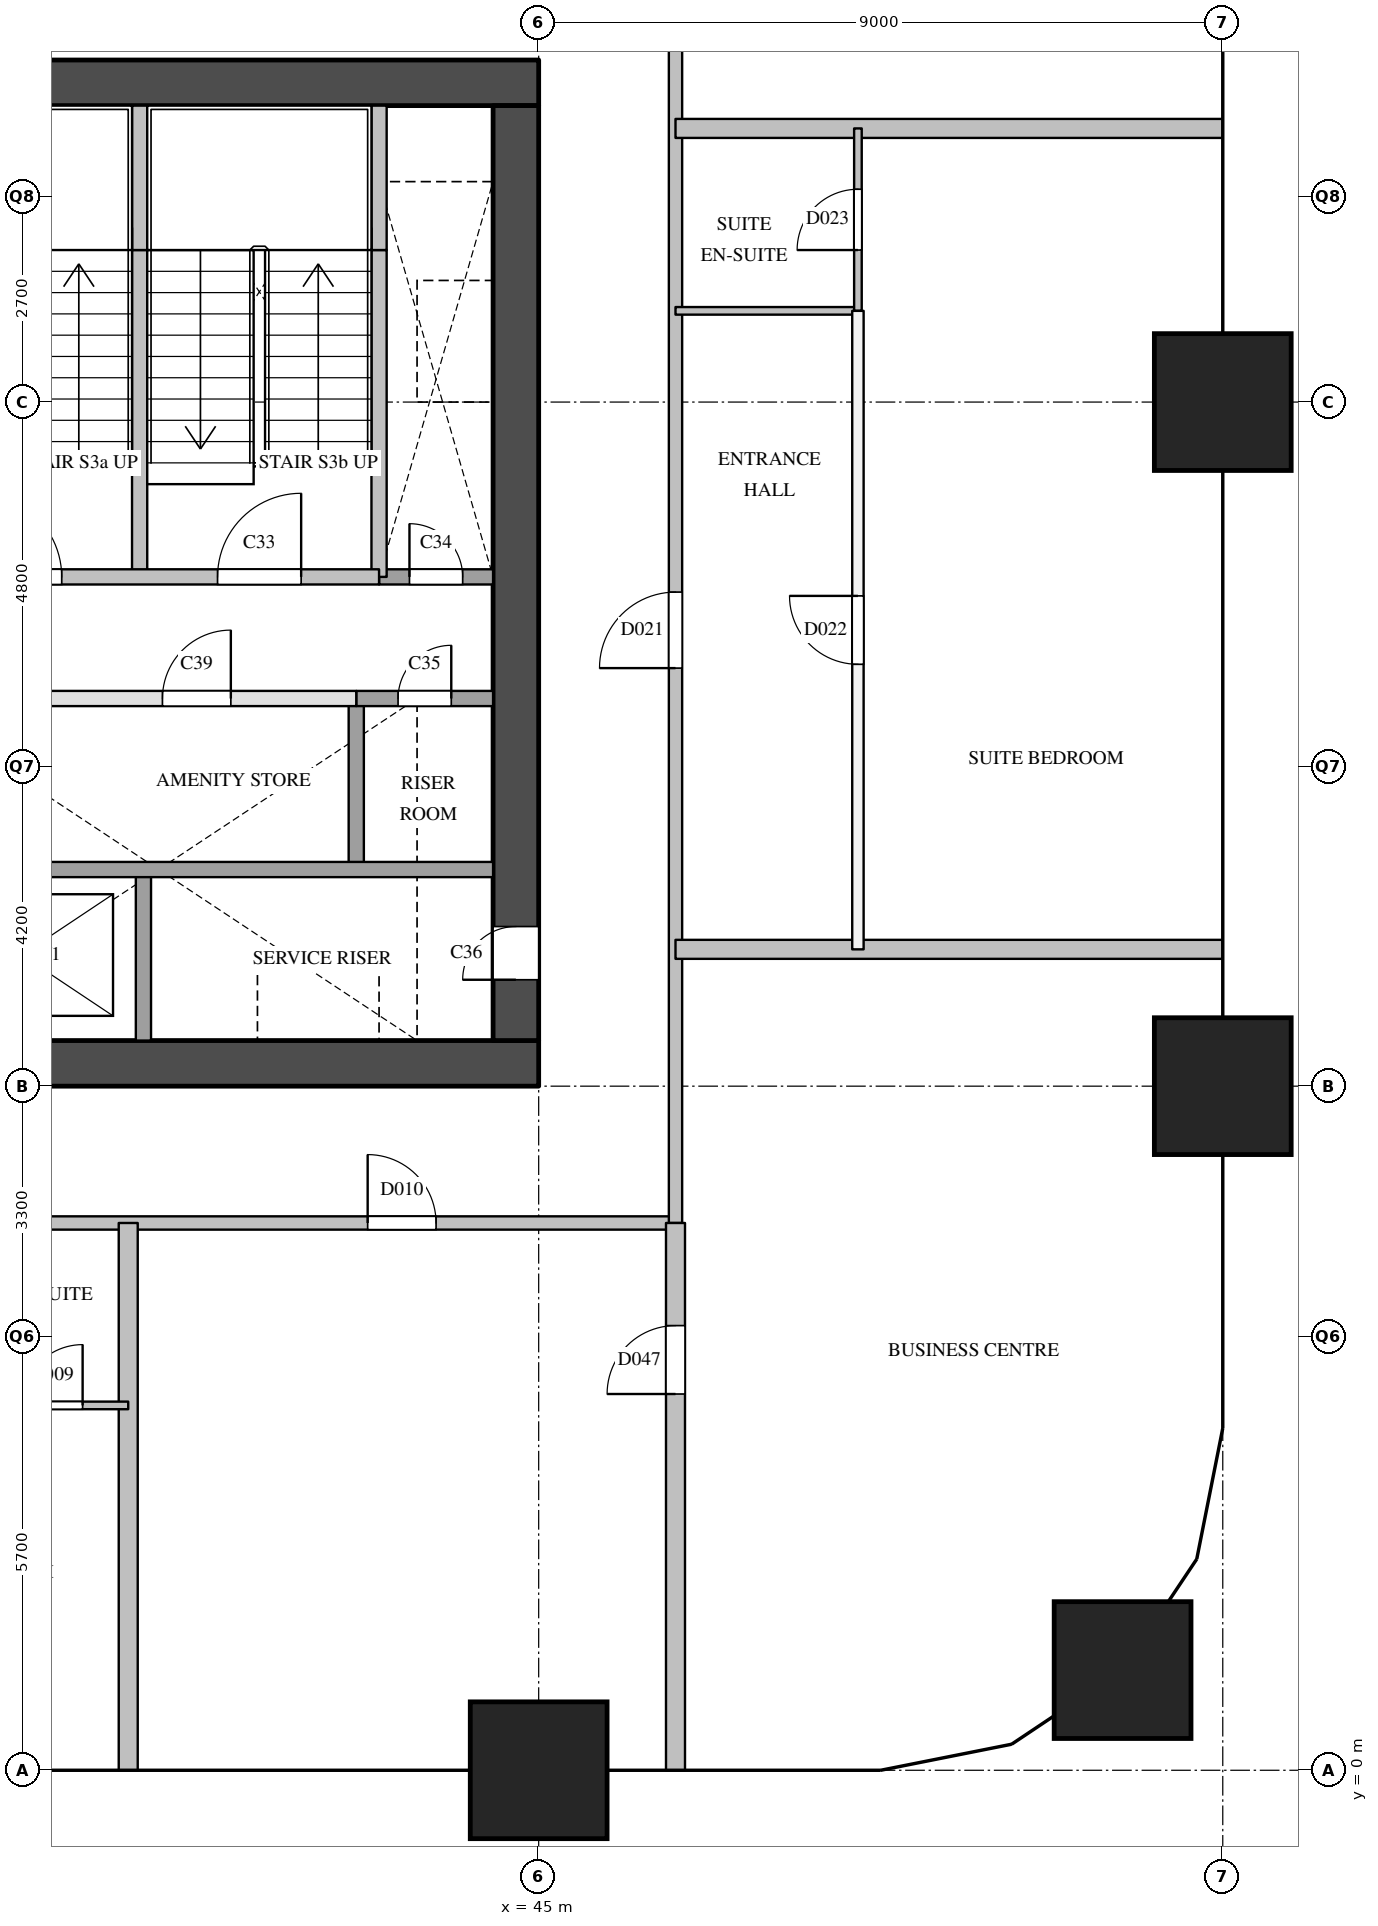
"""IFC4 building model, lengths in metres.
Left out: names, types, materials, properties, quantities, classifications, styles, units other than length and angle.
Written with IfcOpenShell. Run it as: python <this file> out.ifc"""

import sys

from ifc_helpers import new_model, si_unit, direction, frame, frame_2d, origin, origin_2d, place, context, subcontext, project, spatial, rectangle, extrude, element, fill, save


model = new_model("IFC4")
c1 = context("Model", 3, precision=1e-05, world=origin(), true_north=direction((0.0, 1.0)))
c2 = subcontext(c1, "Body", "Model", "MODEL_VIEW")
j1 = project(units=[si_unit("LENGTHUNIT", "METRE"), si_unit("PLANEANGLEUNIT", "RADIAN")], contexts=[c1])
p1 = place(None, origin())
s1 = spatial("IfcSite", under=j1, at=p1, CompositionType="ELEMENT")
p2 = place(p1, origin())
s2 = spatial("IfcBuilding", under=s1, at=p2, CompositionType="ELEMENT")
p3 = place(p2, frame((0.0, 0.0, 57.6)))
s3 = spatial("IfcBuildingStorey", under=s2, at=p3, CompositionType="ELEMENT", Elevation=57.6)
for number, where, z_axis, x_axis in (
    (1, (45.0, 0.0, 0.0), (0.0, 0.0, 1.0), (1.0, 0.0, 0.0)),
    (2, (52.682, 1.318, 0.0), (0.0, 0.0, 1.0), (1.0, 0.0, 0.0)),
    (3, (54.0, 9.0, 0.0), (0.0, 0.0, 1.0), (1.0, 0.0, 0.0)),
    (4, (54.0, 18.0, 0.0), (0.0, 0.0, 1.0), (1.0, 0.0, 0.0)),
):
    element("IfcColumn", number, at=place(p3, frame(where, z_axis=z_axis, x_axis=x_axis)), inside=s3, PredefinedType="COLUMN", context=c2, shape_type="SweptSolid", body=[
        extrude(rectangle(XDim=1.8, YDim=1.8, at=origin_2d()), origin(), (0.0, 0.0, 1.0), 3.8),
    ])
for number, where, z_axis, x_axis in (
    (5, (36.0, 9.3, 0.0), (0.0, 0.0, 1.0), (1.0, 0.0, 0.0)),
    (6, (36.0, 22.2, 0.0), (0.0, 0.0, 1.0), (1.0, 0.0, 0.0)),
):
    element("IfcWall", number, at=place(p3, frame(where, z_axis=z_axis, x_axis=x_axis)), inside=s3, PredefinedType="SHEAR", context=c2, shape_type="SweptSolid", body=[
        extrude(rectangle(XDim=9.0, YDim=0.6, at=frame_2d((4.5, 0.0))), origin(), (0.0, 0.0, 1.0), 3.5),
    ])
p4 = place(p3, frame((44.7, 9.6, 0.0), z_axis=(0.0, 0.0, 1.0), x_axis=(0.0, 1.0, 0.0)))
e7 = element("IfcWall", 7, at=p4, inside=s3, PredefinedType="SHEAR", context=c2, shape_type="SweptSolid", body=[
    extrude(rectangle(XDim=12.3, YDim=0.6, at=frame_2d((6.15, 0.0))), origin(), (0.0, 0.0, 1.0), 3.5),
])
p5 = place(p4, frame((0.8, 0.0, 0.0)))
e8 = element("IfcOpeningElement", 8, at=p5, cuts=e7, PredefinedType="OPENING", context=c2, shape_type="SweptSolid", body=[
    extrude(rectangle(XDim=0.7, YDim=2.1, at=frame_2d((0.35, 1.05))), frame((0.0, 0.31, 0.0), z_axis=(0.0, -1.0, 0.0), x_axis=(1.0, 0.0, 0.0)), (0.0, 0.0, 1.0), 0.62),
])
p6 = place(p3, frame((39.75, 15.7, 0.0), z_axis=(0.0, 0.0, 1.0), x_axis=(0.0, 1.0, 0.0)))
e9 = element("IfcWall", 9, at=p6, inside=s3, PredefinedType="SOLIDWALL", context=c2, shape_type="SweptSolid", body=[
    extrude(rectangle(XDim=4.3, YDim=0.2, at=frame_2d((2.15, 0.0))), origin(), (0.0, 0.0, 1.0), 3.5),
])
p7 = place(p3, frame((39.75, 20.0, 0.0), z_axis=(0.0, 0.0, 1.0), x_axis=(0.0, 1.0, 0.0)))
e10 = element("IfcWall", 10, at=p7, inside=s3, PredefinedType="SOLIDWALL", context=c2, shape_type="SweptSolid", body=[
    extrude(rectangle(XDim=1.9, YDim=0.2, at=frame_2d((0.95, 0.0))), origin(), (0.0, 0.0, 1.0), 3.5),
])
p8 = place(p3, frame((39.8, 9.6, 0.0), z_axis=(0.0, 0.0, 1.0), x_axis=(0.0, 1.0, 0.0)))
e11 = element("IfcWall", 11, at=p8, inside=s3, PredefinedType="SOLIDWALL", context=c2, shape_type="SweptSolid", body=[
    extrude(rectangle(XDim=2.3, YDim=0.2, at=frame_2d((1.15, 0.0))), origin(), (0.0, 0.0, 1.0), 3.5),
])
p9 = place(p3, frame((42.6, 11.9, 0.0), z_axis=(0.0, 0.0, 1.0), x_axis=(0.0, 1.0, 0.0)))
e12 = element("IfcWall", 12, at=p9, inside=s3, PredefinedType="SOLIDWALL", context=c2, shape_type="SweptSolid", body=[
    extrude(rectangle(XDim=2.2, YDim=0.2, at=frame_2d((1.1, 0.0))), origin(), (0.0, 0.0, 1.0), 3.5),
])
p10 = place(p3, frame((42.9, 15.7, 0.0), z_axis=(0.0, 0.0, 1.0), x_axis=(0.0, 1.0, 0.0)))
e13 = element("IfcWall", 13, at=p10, inside=s3, PredefinedType="SOLIDWALL", context=c2, shape_type="SweptSolid", body=[
    extrude(rectangle(XDim=4.3, YDim=0.2, at=frame_2d((2.15, 0.0))), origin(), (0.0, 0.0, 1.0), 3.5),
])
p11 = place(p3, frame((42.9, 20.0, 0.0), z_axis=(0.0, 0.0, 1.0), x_axis=(0.0, 1.0, 0.0)))
e14 = element("IfcWall", 14, at=p11, inside=s3, PredefinedType="SOLIDWALL", context=c2, shape_type="SweptSolid", body=[
    extrude(rectangle(XDim=1.9, YDim=0.2, at=frame_2d((0.95, 0.0))), origin(), (0.0, 0.0, 1.0), 3.5),
])
p12 = place(p3, frame((36.6, 11.85, 0.0), z_axis=(0.0, 0.0, 1.0), x_axis=(1.0, 0.0, 0.0)))
e15 = element("IfcWall", 15, at=p12, inside=s3, PredefinedType="SOLIDWALL", context=c2, shape_type="SweptSolid", body=[
    extrude(rectangle(XDim=7.8, YDim=0.2, at=frame_2d((3.9, 0.0))), origin(), (0.0, 0.0, 1.0), 3.5),
])
p13 = place(p3, frame((36.6, 14.1, 0.0), z_axis=(0.0, 0.0, 1.0), x_axis=(1.0, 0.0, 0.0)))
e16 = element("IfcWall", 16, at=p13, inside=s3, PredefinedType="PARTITIONING", context=c2, shape_type="SweptSolid", body=[
    extrude(rectangle(XDim=6.0, YDim=0.2, at=frame_2d((3.0, 0.0))), origin(), (0.0, 0.0, 1.0), 3.5),
])
p14 = place(p13, frame((0.45, 0.0, 0.0)))
e17 = element("IfcOpeningElement", 17, at=p14, cuts=e16, PredefinedType="OPENING", context=c2, shape_type="SweptSolid", body=[
    extrude(rectangle(XDim=0.9, YDim=2.1, at=frame_2d((0.45, 1.05))), frame((0.0, 0.11, 0.0), z_axis=(0.0, -1.0, 0.0), x_axis=(1.0, 0.0, 0.0)), (0.0, 0.0, 1.0), 0.22),
])
p15 = place(p13, frame((3.45, 0.0, 0.0)))
e18 = element("IfcOpeningElement", 18, at=p15, cuts=e16, PredefinedType="OPENING", context=c2, shape_type="SweptSolid", body=[
    extrude(rectangle(XDim=0.9, YDim=2.1, at=frame_2d((0.45, 1.05))), frame((0.0, 0.11, 0.0), z_axis=(0.0, -1.0, 0.0), x_axis=(1.0, 0.0, 0.0)), (0.0, 0.0, 1.0), 0.22),
])
p16 = place(p3, frame((42.6, 14.1, 0.0), z_axis=(0.0, 0.0, 1.0), x_axis=(1.0, 0.0, 0.0)))
e19 = element("IfcWall", 19, at=p16, inside=s3, PredefinedType="SOLIDWALL", context=c2, shape_type="SweptSolid", body=[
    extrude(rectangle(XDim=1.8, YDim=0.2, at=frame_2d((0.9, 0.0))), origin(), (0.0, 0.0, 1.0), 3.5),
])
p17 = place(p16, frame((0.55, 0.0, 0.0)))
e20 = element("IfcOpeningElement", 20, at=p17, cuts=e19, PredefinedType="OPENING", context=c2, shape_type="SweptSolid", body=[
    extrude(rectangle(XDim=0.7, YDim=2.1, at=frame_2d((0.35, 1.05))), frame((0.0, 0.11, 0.0), z_axis=(0.0, -1.0, 0.0), x_axis=(1.0, 0.0, 0.0)), (0.0, 0.0, 1.0), 0.22),
])
p18 = place(p3, frame((42.9, 15.7, 0.0), z_axis=(0.0, 0.0, 1.0), x_axis=(1.0, 0.0, 0.0)))
e21 = element("IfcWall", 21, at=p18, inside=s3, PredefinedType="SOLIDWALL", context=c2, shape_type="SweptSolid", body=[
    extrude(rectangle(XDim=1.5, YDim=0.2, at=frame_2d((0.75, 0.0))), origin(), (0.0, 0.0, 1.0), 3.5),
])
p19 = place(p18, frame((0.4, 0.0, 0.0)))
e22 = element("IfcOpeningElement", 22, at=p19, cuts=e21, PredefinedType="OPENING", context=c2, shape_type="SweptSolid", body=[
    extrude(rectangle(XDim=0.7, YDim=2.1, at=frame_2d((0.35, 1.05))), frame((0.0, 0.11, 0.0), z_axis=(0.0, -1.0, 0.0), x_axis=(1.0, 0.0, 0.0)), (0.0, 0.0, 1.0), 0.22),
])
p20 = place(p3, frame((36.6, 15.7, 0.0), z_axis=(0.0, 0.0, 1.0), x_axis=(1.0, 0.0, 0.0)))
e23 = element("IfcWall", 23, at=p20, inside=s3, PredefinedType="SOLIDWALL", context=c2, shape_type="SweptSolid", body=[
    extrude(rectangle(XDim=6.3, YDim=0.2, at=frame_2d((3.15, 0.0))), origin(), (0.0, 0.0, 1.0), 3.5),
])
p21 = place(p20, frame((1.025, 0.0, 0.0)))
e24 = element("IfcOpeningElement", 24, at=p21, cuts=e23, PredefinedType="OPENING", context=c2, shape_type="SweptSolid", body=[
    extrude(rectangle(XDim=1.1, YDim=2.1, at=frame_2d((0.55, 1.05))), frame((0.0, 0.11, 0.0), z_axis=(0.0, -1.0, 0.0), x_axis=(1.0, 0.0, 0.0)), (0.0, 0.0, 1.0), 0.22),
])
p22 = place(p20, frame((4.175, 0.0, 0.0)))
e25 = element("IfcOpeningElement", 25, at=p22, cuts=e23, PredefinedType="OPENING", context=c2, shape_type="SweptSolid", body=[
    extrude(rectangle(XDim=1.1, YDim=2.1, at=frame_2d((0.55, 1.05))), frame((0.0, 0.11, 0.0), z_axis=(0.0, -1.0, 0.0), x_axis=(1.0, 0.0, 0.0)), (0.0, 0.0, 1.0), 0.22),
])
p23 = place(p3, frame((34.2, 7.2, 0.0), z_axis=(0.0, 0.0, 1.0), x_axis=(1.0, 0.0, 0.0)))
e26 = element("IfcWall", 26, at=p23, inside=s3, PredefinedType="PARTITIONING", context=c2, shape_type="SweptSolid", body=[
    extrude(rectangle(XDim=12.6, YDim=0.175, at=frame_2d((6.3, 0.0))), origin(), (0.0, 0.0, 1.0), 3.5),
])
p24 = place(p23, frame((0.4, 0.0, 0.0)))
e27 = element("IfcOpeningElement", 27, at=p24, cuts=e26, PredefinedType="OPENING", context=c2, shape_type="SweptSolid", body=[
    extrude(rectangle(XDim=1.0, YDim=2.1, at=frame_2d((0.5, 1.05))), frame((0.0, 0.097, 0.0), z_axis=(0.0, -1.0, 0.0), x_axis=(1.0, 0.0, 0.0)), (0.0, 0.0, 1.0), 0.195),
])
p25 = place(p23, frame((2.1, 0.0, 0.0)))
e28 = element("IfcOpeningElement", 28, at=p25, cuts=e26, PredefinedType="OPENING", context=c2, shape_type="SweptSolid", body=[
    extrude(rectangle(XDim=1.0, YDim=2.1, at=frame_2d((0.5, 1.05))), frame((0.0, 0.097, 0.0), z_axis=(0.0, -1.0, 0.0), x_axis=(1.0, 0.0, 0.0)), (0.0, 0.0, 1.0), 0.195),
])
p26 = place(p23, frame((8.55, 0.0, 0.0)))
e29 = element("IfcOpeningElement", 29, at=p26, cuts=e26, PredefinedType="OPENING", context=c2, shape_type="SweptSolid", body=[
    extrude(rectangle(XDim=0.9, YDim=2.1, at=frame_2d((0.45, 1.05))), frame((0.0, 0.097, 0.0), z_axis=(0.0, -1.0, 0.0), x_axis=(1.0, 0.0, 0.0)), (0.0, 0.0, 1.0), 0.195),
])
p27 = place(p3, frame((46.8, 7.2, 0.0), z_axis=(0.0, 0.0, 1.0), x_axis=(0.0, 1.0, 0.0)))
e30 = element("IfcWall", 30, at=p27, inside=s3, PredefinedType="PARTITIONING", context=c2, shape_type="SweptSolid", body=[
    extrude(rectangle(XDim=16.49, YDim=0.175, at=frame_2d((8.245, 0.0))), origin(), (0.0, 0.0, 1.0), 3.5),
])
p28 = place(p27, frame((7.3, 0.0, 0.0)))
e31 = element("IfcOpeningElement", 31, at=p28, cuts=e30, PredefinedType="OPENING", context=c2, shape_type="SweptSolid", body=[
    extrude(rectangle(XDim=1.0, YDim=2.1, at=frame_2d((0.5, 1.05))), frame((0.0, 0.097, 0.0), z_axis=(0.0, -1.0, 0.0), x_axis=(1.0, 0.0, 0.0)), (0.0, 0.0, 1.0), 0.195),
])
p29 = place(p3, frame((49.2, 10.8, 0.0), z_axis=(0.0, 0.0, 1.0), x_axis=(0.0, 1.0, 0.0)))
e32 = element("IfcWall", 32, at=p29, inside=s3, PredefinedType="PARTITIONING", context=c2, shape_type="SweptSolid", body=[
    extrude(rectangle(XDim=8.4, YDim=0.15, at=frame_2d((4.2, 0.0))), origin(), (0.0, 0.0, 1.0), 3.5),
])
p30 = place(p29, frame((3.75, 0.0, 0.0)))
e33 = element("IfcOpeningElement", 33, at=p30, cuts=e32, PredefinedType="OPENING", context=c2, shape_type="SweptSolid", body=[
    extrude(rectangle(XDim=0.9, YDim=2.1, at=frame_2d((0.45, 1.05))), frame((0.0, 0.085, 0.0), z_axis=(0.0, -1.0, 0.0), x_axis=(1.0, 0.0, 0.0)), (0.0, 0.0, 1.0), 0.17),
])
for number, where, z_axis, x_axis in (
    (34, (46.8, 10.8, 0.0), (0.0, 0.0, 1.0), (1.0, 0.0, 0.0)),
    (35, (46.8, 21.6, 0.0), (0.0, 0.0, 1.0), (1.0, 0.0, 0.0)),
    (36, (39.6, 0.0, 0.0), (0.0, 0.0, 1.0), (0.0, 1.0, 0.0)),
):
    element("IfcWall", number, at=place(p3, frame(where, z_axis=z_axis, x_axis=x_axis)), inside=s3, PredefinedType="PARTITIONING", context=c2, shape_type="SweptSolid", body=[
        extrude(rectangle(XDim=7.2, YDim=0.25, at=frame_2d((3.6, 0.0))), origin(), (0.0, 0.0, 1.0), 2.5),
    ])
p31 = place(p3, frame((46.8, 0.0, 0.0), z_axis=(0.0, 0.0, 1.0), x_axis=(0.0, 1.0, 0.0)))
e37 = element("IfcWall", 37, at=p31, inside=s3, PredefinedType="PARTITIONING", context=c2, shape_type="SweptSolid", body=[
    extrude(rectangle(XDim=7.2, YDim=0.25, at=frame_2d((3.6, 0.0))), origin(), (0.0, 0.0, 1.0), 2.5),
])
p32 = place(p31, frame((4.95, 0.0, 0.0)))
e38 = element("IfcOpeningElement", 38, at=p32, cuts=e37, PredefinedType="OPENING", context=c2, shape_type="SweptSolid", body=[
    extrude(rectangle(XDim=0.9, YDim=2.1, at=frame_2d((0.45, 1.05))), frame((0.0, 0.135, 0.0), z_axis=(0.0, -1.0, 0.0), x_axis=(1.0, 0.0, 0.0)), (0.0, 0.0, 1.0), 0.27),
])
p33 = place(p3, frame((37.6, 4.8, 0.0), z_axis=(0.0, 0.0, 1.0), x_axis=(1.0, 0.0, 0.0)))
e39 = element("IfcWall", 39, at=p33, inside=s3, PredefinedType="PARTITIONING", context=c2, shape_type="SweptSolid", body=[
    extrude(rectangle(XDim=2.0, YDim=0.1, at=frame_2d((1.0, 0.0))), origin(), (0.0, 0.0, 1.0), 3.5),
])
p34 = place(p33, frame((0.6, 0.0, 0.0)))
e40 = element("IfcOpeningElement", 40, at=p34, cuts=e39, PredefinedType="OPENING", context=c2, shape_type="SweptSolid", body=[
    extrude(rectangle(XDim=0.8, YDim=2.1, at=frame_2d((0.4, 1.05))), frame((0.0, 0.06, 0.0), z_axis=(0.0, -1.0, 0.0), x_axis=(1.0, 0.0, 0.0)), (0.0, 0.0, 1.0), 0.12),
])
p35 = place(p3, frame((46.8, 19.2, 0.0), z_axis=(0.0, 0.0, 1.0), x_axis=(1.0, 0.0, 0.0)))
e41 = element("IfcWall", 41, at=p35, inside=s3, PredefinedType="PARTITIONING", context=c2, shape_type="SweptSolid", body=[
    extrude(rectangle(XDim=2.4, YDim=0.1, at=frame_2d((1.2, 0.0))), origin(), (0.0, 0.0, 1.0), 3.5),
])
p36 = place(p3, frame((49.2, 19.2, 0.0), z_axis=(0.0, 0.0, 1.0), x_axis=(0.0, 1.0, 0.0)))
e42 = element("IfcWall", 42, at=p36, inside=s3, PredefinedType="PARTITIONING", context=c2, shape_type="SweptSolid", body=[
    extrude(rectangle(XDim=2.4, YDim=0.1, at=frame_2d((1.2, 0.0))), origin(), (0.0, 0.0, 1.0), 3.5),
])
p37 = place(p36, frame((0.8, 0.0, 0.0)))
e43 = element("IfcOpeningElement", 43, at=p37, cuts=e42, PredefinedType="OPENING", context=c2, shape_type="SweptSolid", body=[
    extrude(rectangle(XDim=0.8, YDim=2.1, at=frame_2d((0.4, 1.05))), frame((0.0, 0.06, 0.0), z_axis=(0.0, -1.0, 0.0), x_axis=(1.0, 0.0, 0.0)), (0.0, 0.0, 1.0), 0.12),
])
p38 = place(p21, origin())
e44 = element("IfcDoor", 44, at=p38, inside=s3, OperationType="SINGLE_SWING_LEFT", PredefinedType="DOOR", context=c2, shape_type="SweptSolid", body=[
    extrude(rectangle(XDim=1.1, YDim=2.1, at=frame_2d((0.55, 1.05))), frame((0.0, 0.025, 0.0), z_axis=(0.0, -1.0, 0.0), x_axis=(1.0, 0.0, 0.0)), (0.0, 0.0, 1.0), 0.05),
])
fill(e24, e44)
p39 = place(p22, origin())
e45 = element("IfcDoor", 45, at=p39, inside=s3, OperationType="SINGLE_SWING_RIGHT", PredefinedType="DOOR", context=c2, shape_type="SweptSolid", body=[
    extrude(rectangle(XDim=1.1, YDim=2.1, at=frame_2d((0.55, 1.05))), frame((0.0, 0.025, 0.0), z_axis=(0.0, -1.0, 0.0), x_axis=(1.0, 0.0, 0.0)), (0.0, 0.0, 1.0), 0.05),
])
fill(e25, e45)
p40 = place(p19, origin())
e46 = element("IfcDoor", 46, at=p40, inside=s3, OperationType="SINGLE_SWING_LEFT", PredefinedType="DOOR", context=c2, shape_type="SweptSolid", body=[
    extrude(rectangle(XDim=0.7, YDim=2.1, at=frame_2d((0.35, 1.05))), frame((0.0, 0.025, 0.0), z_axis=(0.0, -1.0, 0.0), x_axis=(1.0, 0.0, 0.0)), (0.0, 0.0, 1.0), 0.05),
])
fill(e22, e46)
p41 = place(p17, origin())
e47 = element("IfcDoor", 47, at=p41, inside=s3, OperationType="SINGLE_SWING_RIGHT", PredefinedType="DOOR", context=c2, shape_type="SweptSolid", body=[
    extrude(rectangle(XDim=0.7, YDim=2.1, at=frame_2d((0.35, 1.05))), frame((0.0, 0.025, 0.0), z_axis=(0.0, -1.0, 0.0), x_axis=(1.0, 0.0, 0.0)), (0.0, 0.0, 1.0), 0.05),
])
fill(e20, e47)
p42 = place(p5, origin())
e48 = element("IfcDoor", 48, at=p42, inside=s3, OperationType="SINGLE_SWING_LEFT", PredefinedType="DOOR", context=c2, shape_type="SweptSolid", body=[
    extrude(rectangle(XDim=0.7, YDim=2.1, at=frame_2d((0.35, 1.05))), frame((0.0, 0.025, 0.0), z_axis=(0.0, -1.0, 0.0), x_axis=(1.0, 0.0, 0.0)), (0.0, 0.0, 1.0), 0.05),
])
fill(e8, e48)
p43 = place(p15, origin())
e49 = element("IfcDoor", 49, at=p43, inside=s3, OperationType="SINGLE_SWING_RIGHT", PredefinedType="DOOR", context=c2, shape_type="SweptSolid", body=[
    extrude(rectangle(XDim=0.9, YDim=2.1, at=frame_2d((0.45, 1.05))), frame((0.0, 0.025, 0.0), z_axis=(0.0, -1.0, 0.0), x_axis=(1.0, 0.0, 0.0)), (0.0, 0.0, 1.0), 0.05),
])
fill(e18, e49)
p44 = place(p34, origin())
e50 = element("IfcDoor", 50, at=p44, inside=s3, OperationType="SINGLE_SWING_RIGHT", PredefinedType="DOOR", context=c2, shape_type="SweptSolid", body=[
    extrude(rectangle(XDim=0.8, YDim=2.1, at=frame_2d((0.4, 1.05))), frame((0.0, 0.025, 0.0), z_axis=(0.0, -1.0, 0.0), x_axis=(1.0, 0.0, 0.0)), (0.0, 0.0, 1.0), 0.05),
])
fill(e40, e50)
p45 = place(p26, origin())
e51 = element("IfcDoor", 51, at=p45, inside=s3, OperationType="SINGLE_SWING_LEFT", PredefinedType="DOOR", context=c2, shape_type="SweptSolid", body=[
    extrude(rectangle(XDim=0.9, YDim=2.1, at=frame_2d((0.45, 1.05))), frame((0.0, 0.025, 0.0), z_axis=(0.0, -1.0, 0.0), x_axis=(1.0, 0.0, 0.0)), (0.0, 0.0, 1.0), 0.05),
])
fill(e29, e51)
p46 = place(p28, origin())
e52 = element("IfcDoor", 52, at=p46, inside=s3, OperationType="SINGLE_SWING_LEFT", PredefinedType="DOOR", context=c2, shape_type="SweptSolid", body=[
    extrude(rectangle(XDim=1.0, YDim=2.1, at=frame_2d((0.5, 1.05))), frame((0.0, 0.025, 0.0), z_axis=(0.0, -1.0, 0.0), x_axis=(1.0, 0.0, 0.0)), (0.0, 0.0, 1.0), 0.05),
])
fill(e31, e52)
p47 = place(p30, origin())
e53 = element("IfcDoor", 53, at=p47, inside=s3, OperationType="SINGLE_SWING_RIGHT", PredefinedType="DOOR", context=c2, shape_type="SweptSolid", body=[
    extrude(rectangle(XDim=0.9, YDim=2.1, at=frame_2d((0.45, 1.05))), frame((0.0, 0.025, 0.0), z_axis=(0.0, -1.0, 0.0), x_axis=(1.0, 0.0, 0.0)), (0.0, 0.0, 1.0), 0.05),
])
fill(e33, e53)
p48 = place(p37, origin())
e54 = element("IfcDoor", 54, at=p48, inside=s3, OperationType="SINGLE_SWING_LEFT", PredefinedType="DOOR", context=c2, shape_type="SweptSolid", body=[
    extrude(rectangle(XDim=0.8, YDim=2.1, at=frame_2d((0.4, 1.05))), frame((0.0, 0.025, 0.0), z_axis=(0.0, -1.0, 0.0), x_axis=(1.0, 0.0, 0.0)), (0.0, 0.0, 1.0), 0.05),
])
fill(e43, e54)
p49 = place(p32, origin())
e55 = element("IfcDoor", 55, at=p49, inside=s3, OperationType="SINGLE_SWING_LEFT", PredefinedType="DOOR", context=c2, shape_type="SweptSolid", body=[
    extrude(rectangle(XDim=0.9, YDim=2.1, at=frame_2d((0.45, 1.05))), frame((0.0, 0.025, 0.0), z_axis=(0.0, -1.0, 0.0), x_axis=(1.0, 0.0, 0.0)), (0.0, 0.0, 1.0), 0.05),
])
fill(e38, e55)
save(model, sys.argv[1])
